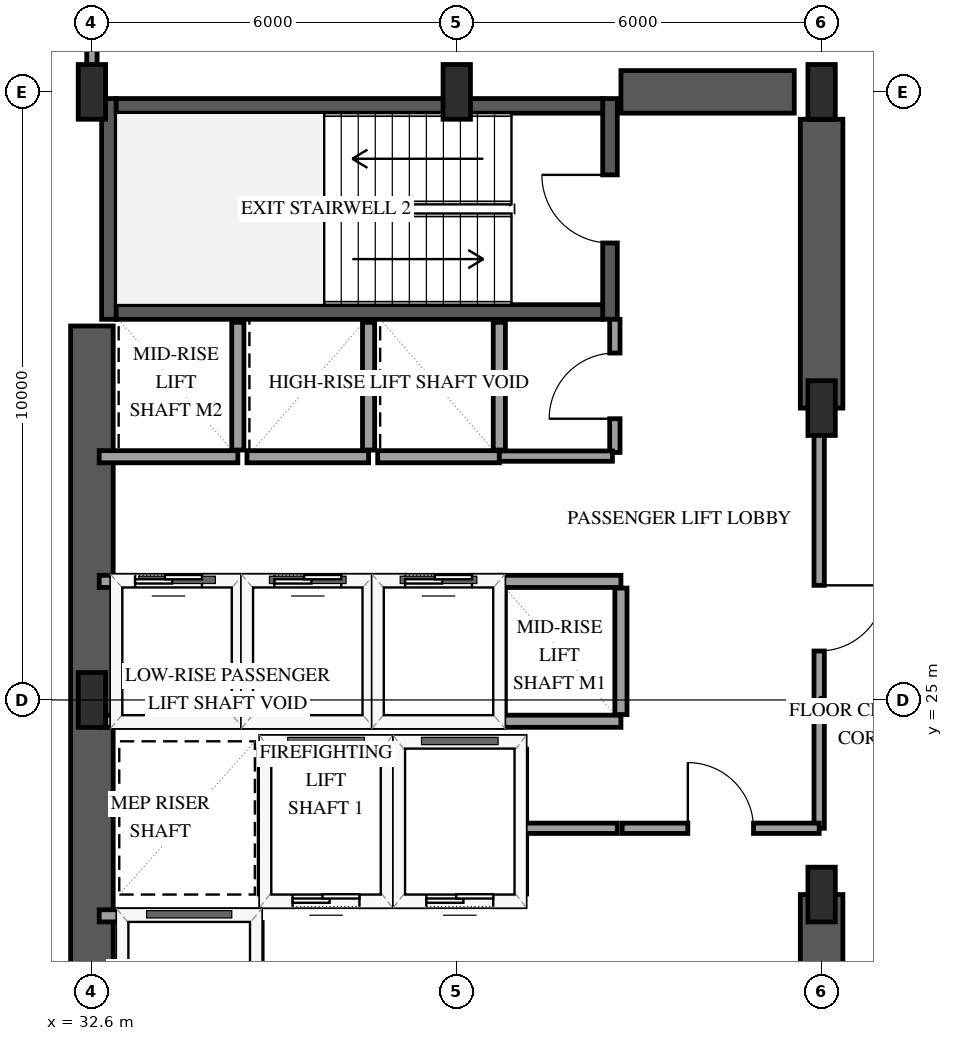
"""IFC4 building model, lengths in metres.
Left out: names, types, materials, properties, quantities, classifications, styles, units other than length and angle.
Written with IfcOpenShell. Run it as: python <this file> out.ifc"""

import sys

from ifc_helpers import new_model, si_unit, direction, frame, frame_2d, origin, origin_2d, place, context, subcontext, project, spatial, rectangle, extrude, element, fill, save


model = new_model("IFC4")
c1 = context("Model", 3, precision=1e-05, world=origin(), true_north=direction((0.0, 1.0)))
c2 = subcontext(c1, "Body", "Model", "MODEL_VIEW")
j1 = project(units=[si_unit("LENGTHUNIT", "METRE"), si_unit("PLANEANGLEUNIT", "RADIAN")], contexts=[c1])
p1 = place(None, origin())
s1 = spatial("IfcSite", under=j1, at=p1, CompositionType="ELEMENT")
p2 = place(p1, origin())
s2 = spatial("IfcBuilding", under=s1, at=p2, CompositionType="ELEMENT")
p3 = place(p2, frame((0.0, 0.0, 66.6)))
s3 = spatial("IfcBuildingStorey", under=s2, at=p3, CompositionType="ELEMENT", Elevation=66.6)
p4 = place(p3, frame((32.88, 31.26, 0.0), z_axis=(0.0, 0.0, 1.0), x_axis=(0.0, 1.0, 0.0)))
e1 = element("IfcWall", 1, at=p4, inside=s3, PredefinedType="SHEAR", context=c2, shape_type="SweptSolid", body=[
    extrude(rectangle(XDim=3.63, YDim=0.24, at=frame_2d((1.815, 0.0))), origin(), (0.0, 0.0, 1.0), 4.0),
])
p5 = place(p3, frame((41.12, 31.26, 0.0), z_axis=(0.0, 0.0, 1.0), x_axis=(0.0, 1.0, 0.0)))
e2 = element("IfcWall", 2, at=p5, inside=s3, PredefinedType="SHEAR", context=c2, shape_type="SweptSolid", body=[
    extrude(rectangle(XDim=3.63, YDim=0.24, at=frame_2d((1.815, 0.0))), origin(), (0.0, 0.0, 1.0), 4.0),
])
p6 = place(p5, frame((1.255, 0.0, 0.0)))
e3 = element("IfcOpeningElement", 3, at=p6, cuts=e2, PredefinedType="OPENING", context=c2, shape_type="SweptSolid", body=[
    extrude(rectangle(XDim=1.12, YDim=2.15, at=frame_2d((0.56, 1.075))), frame((0.0, 0.13, 0.0), z_axis=(0.0, -1.0, 0.0), x_axis=(1.0, 0.0, 0.0)), (0.0, 0.0, 1.0), 0.26),
])
for number, where, z_axis, x_axis in (
    (4, (33.0, 31.38, 0.0), (0.0, 0.0, 1.0), (1.0, 0.0, 0.0)),
    (5, (33.0, 34.77, 0.0), (0.0, 0.0, 1.0), (1.0, 0.0, 0.0)),
):
    element("IfcWall", number, at=place(p3, frame(where, z_axis=z_axis, x_axis=x_axis)), inside=s3, PredefinedType="SHEAR", context=c2, shape_type="SweptSolid", body=[
        extrude(rectangle(XDim=8.0, YDim=0.24, at=frame_2d((4.0, 0.0))), origin(), (0.0, 0.0, 1.0), 4.0),
    ])
p7 = place(p3, frame((32.6, 18.85, 0.0), z_axis=(0.0, 0.0, 1.0), x_axis=(0.0, 1.0, 0.0)))
e6 = element("IfcWall", 6, at=p7, inside=s3, PredefinedType="SHEAR", context=c2, shape_type="SweptSolid", body=[
    extrude(rectangle(XDim=12.3, YDim=0.7, at=frame_2d((6.15, 0.0))), origin(), (0.0, 0.0, 1.0), 4.0),
])
p8 = place(p3, frame((41.3, 35.0, 0.0), z_axis=(0.0, 0.0, 1.0), x_axis=(1.0, 0.0, 0.0)))
e7 = element("IfcWall", 7, at=p8, inside=s3, PredefinedType="SHEAR", context=c2, shape_type="SweptSolid", body=[
    extrude(rectangle(XDim=2.85, YDim=0.7, at=frame_2d((1.425, 0.0))), origin(), (0.0, 0.0, 1.0), 4.0),
])
p9 = place(p3, frame((44.6, 15.45, 0.0), z_axis=(0.0, 0.0, 1.0), x_axis=(0.0, 1.0, 0.0)))
e8 = element("IfcWall", 8, at=p9, inside=s3, PredefinedType="SHEAR", context=c2, shape_type="SweptSolid", body=[
    extrude(rectangle(XDim=6.35, YDim=0.7, at=frame_2d((3.175, 0.0))), origin(), (0.0, 0.0, 1.0), 4.0),
])
p10 = place(p3, frame((44.6, 29.8, 0.0), z_axis=(0.0, 0.0, 1.0), x_axis=(0.0, 1.0, 0.0)))
e9 = element("IfcWall", 9, at=p10, inside=s3, PredefinedType="SHEAR", context=c2, shape_type="SweptSolid", body=[
    extrude(rectangle(XDim=4.75, YDim=0.7, at=frame_2d((2.375, 0.0))), origin(), (0.0, 0.0, 1.0), 4.0),
])
for number, where, z_axis, x_axis in (
    (10, (32.6, 25.0, 0.0), (0.0, 0.0, 1.0), (1.0, 0.0, 0.0)),
    (11, (32.6, 35.0, 0.0), (0.0, 0.0, 1.0), (1.0, 0.0, 0.0)),
    (12, (38.6, 35.0, 0.0), (0.0, 0.0, 1.0), (1.0, 0.0, 0.0)),
    (13, (44.6, 21.8, 0.0), (0.0, 0.0, 1.0), (1.0, 0.0, 0.0)),
    (14, (44.6, 29.8, 0.0), (0.0, 0.0, 1.0), (1.0, 0.0, 0.0)),
    (15, (44.6, 35.0, 0.0), (0.0, 0.0, 1.0), (1.0, 0.0, 0.0)),
):
    element("IfcColumn", number, at=place(p3, frame(where, z_axis=z_axis, x_axis=x_axis)), inside=s3, PredefinedType="PILASTER", context=c2, shape_type="SweptSolid", body=[
        extrude(rectangle(XDim=0.45, YDim=0.9, at=origin_2d()), origin(), (0.0, 0.0, 1.0), 4.0),
    ])
p11 = place(p3, frame((35.45, 21.7, 0.0), z_axis=(0.0, 0.0, 1.0), x_axis=(1.0, 0.0, 0.0)))
e16 = element("IfcWall", 16, at=p11, inside=s3, PredefinedType="SOLIDWALL", context=c2, shape_type="SweptSolid", body=[
    extrude(rectangle(XDim=2.0, YDim=0.2, at=frame_2d((1.0, 0.0))), origin(), (0.0, 0.0, 1.0), 3.7),
])
p12 = place(p11, frame((0.45, 0.0, 0.0)))
e17 = element("IfcOpeningElement", 17, at=p12, cuts=e16, PredefinedType="OPENING", context=c2, shape_type="SweptSolid", body=[
    extrude(rectangle(XDim=1.1, YDim=2.15, at=frame_2d((0.55, 1.075))), frame((0.0, 0.11, 0.0), z_axis=(0.0, -1.0, 0.0), x_axis=(1.0, 0.0, 0.0)), (0.0, 0.0, 1.0), 0.22),
])
p13 = place(p3, frame((35.45, 24.3, 0.0), z_axis=(0.0, 0.0, 1.0), x_axis=(1.0, 0.0, 0.0)))
e18 = element("IfcWall", 18, at=p13, inside=s3, PredefinedType="SOLIDWALL", context=c2, shape_type="SweptSolid", body=[
    extrude(rectangle(XDim=2.0, YDim=0.2, at=frame_2d((1.0, 0.0))), origin(), (0.0, 0.0, 1.0), 3.7),
])
for number, where, z_axis, x_axis in (
    (19, (35.45, 21.81, 0.0), (0.0, 0.0, 1.0), (0.0, 1.0, 0.0)),
    (20, (37.45, 21.81, 0.0), (0.0, 0.0, 1.0), (0.0, 1.0, 0.0)),
):
    element("IfcWall", number, at=place(p3, frame(where, z_axis=z_axis, x_axis=x_axis)), inside=s3, PredefinedType="SOLIDWALL", context=c2, shape_type="SweptSolid", body=[
        extrude(rectangle(XDim=2.38, YDim=0.2, at=frame_2d((1.19, 0.0))), origin(), (0.0, 0.0, 1.0), 3.7),
    ])
p14 = place(p3, frame((37.65, 21.7, 0.0), z_axis=(0.0, 0.0, 1.0), x_axis=(1.0, 0.0, 0.0)))
e21 = element("IfcWall", 21, at=p14, inside=s3, PredefinedType="SOLIDWALL", context=c2, shape_type="SweptSolid", body=[
    extrude(rectangle(XDim=2.0, YDim=0.2, at=frame_2d((1.0, 0.0))), origin(), (0.0, 0.0, 1.0), 3.7),
])
p15 = place(p14, frame((0.45, 0.0, 0.0)))
e22 = element("IfcOpeningElement", 22, at=p15, cuts=e21, PredefinedType="OPENING", context=c2, shape_type="SweptSolid", body=[
    extrude(rectangle(XDim=1.1, YDim=2.15, at=frame_2d((0.55, 1.075))), frame((0.0, 0.11, 0.0), z_axis=(0.0, -1.0, 0.0), x_axis=(1.0, 0.0, 0.0)), (0.0, 0.0, 1.0), 0.22),
])
p16 = place(p3, frame((37.65, 24.3, 0.0), z_axis=(0.0, 0.0, 1.0), x_axis=(1.0, 0.0, 0.0)))
e23 = element("IfcWall", 23, at=p16, inside=s3, PredefinedType="SOLIDWALL", context=c2, shape_type="SweptSolid", body=[
    extrude(rectangle(XDim=2.0, YDim=0.2, at=frame_2d((1.0, 0.0))), origin(), (0.0, 0.0, 1.0), 3.7),
])
p17 = place(p3, frame((39.65, 21.81, 0.0), z_axis=(0.0, 0.0, 1.0), x_axis=(0.0, 1.0, 0.0)))
e24 = element("IfcWall", 24, at=p17, inside=s3, PredefinedType="SOLIDWALL", context=c2, shape_type="SweptSolid", body=[
    extrude(rectangle(XDim=2.38, YDim=0.2, at=frame_2d((1.19, 0.0))), origin(), (0.0, 0.0, 1.0), 3.7),
])
p18 = place(p3, frame((32.72, 21.45, 0.0), z_axis=(0.0, 0.0, 1.0), x_axis=(1.0, 0.0, 0.0)))
e25 = element("IfcWall", 25, at=p18, inside=s3, PredefinedType="SOLIDWALL", context=c2, shape_type="SweptSolid", body=[
    extrude(rectangle(XDim=2.58, YDim=0.2, at=frame_2d((1.29, 0.0))), origin(), (0.0, 0.0, 1.0), 3.7),
])
p19 = place(p3, frame((35.3, 18.79, 0.0), z_axis=(0.0, 0.0, 1.0), x_axis=(0.0, 1.0, 0.0)))
e26 = element("IfcWall", 26, at=p19, inside=s3, PredefinedType="SOLIDWALL", context=c2, shape_type="SweptSolid", body=[
    extrude(rectangle(XDim=2.55, YDim=0.2, at=frame_2d((1.275, 0.0))), origin(), (0.0, 0.0, 1.0), 3.7),
])
p20 = place(p19, frame((0.725, 0.0, 0.0)))
e27 = element("IfcOpeningElement", 27, at=p20, cuts=e26, PredefinedType="OPENING", context=c2, shape_type="SweptSolid", body=[
    extrude(rectangle(XDim=1.1, YDim=2.15, at=frame_2d((0.55, 1.075))), frame((0.0, 0.11, 0.0), z_axis=(0.0, -1.0, 0.0), x_axis=(1.0, 0.0, 0.0)), (0.0, 0.0, 1.0), 0.22),
])
p21 = place(p3, frame((32.72, 24.65, 0.0), z_axis=(0.0, 0.0, 1.0), x_axis=(1.0, 0.0, 0.0)))
e28 = element("IfcWall", 28, at=p21, inside=s3, PredefinedType="SOLIDWALL", context=c2, shape_type="SweptSolid", body=[
    extrude(rectangle(XDim=2.28, YDim=0.2, at=frame_2d((1.14, 0.0))), origin(), (0.0, 0.0, 1.0), 3.7),
])
p22 = place(p3, frame((32.72, 26.95, 0.0), z_axis=(0.0, 0.0, 1.0), x_axis=(1.0, 0.0, 0.0)))
e29 = element("IfcWall", 29, at=p22, inside=s3, PredefinedType="SOLIDWALL", context=c2, shape_type="SweptSolid", body=[
    extrude(rectangle(XDim=2.28, YDim=0.2, at=frame_2d((1.14, 0.0))), origin(), (0.0, 0.0, 1.0), 3.7),
])
p23 = place(p22, frame((0.59, 0.0, 0.0)))
e30 = element("IfcOpeningElement", 30, at=p23, cuts=e29, PredefinedType="OPENING", context=c2, shape_type="SweptSolid", body=[
    extrude(rectangle(XDim=1.1, YDim=2.15, at=frame_2d((0.55, 1.075))), frame((0.0, 0.11, 0.0), z_axis=(0.0, -1.0, 0.0), x_axis=(1.0, 0.0, 0.0)), (0.0, 0.0, 1.0), 0.22),
])
p24 = place(p3, frame((35.0, 24.76, 0.0), z_axis=(0.0, 0.0, 1.0), x_axis=(0.0, 1.0, 0.0)))
e31 = element("IfcWall", 31, at=p24, inside=s3, PredefinedType="SOLIDWALL", context=c2, shape_type="SweptSolid", body=[
    extrude(rectangle(XDim=2.08, YDim=0.2, at=frame_2d((1.04, 0.0))), origin(), (0.0, 0.0, 1.0), 3.7),
])
p25 = place(p3, frame((35.15, 24.65, 0.0), z_axis=(0.0, 0.0, 1.0), x_axis=(1.0, 0.0, 0.0)))
e32 = element("IfcWall", 32, at=p25, inside=s3, PredefinedType="SOLIDWALL", context=c2, shape_type="SweptSolid", body=[
    extrude(rectangle(XDim=2.0, YDim=0.2, at=frame_2d((1.0, 0.0))), origin(), (0.0, 0.0, 1.0), 3.7),
])
p26 = place(p3, frame((35.15, 26.95, 0.0), z_axis=(0.0, 0.0, 1.0), x_axis=(1.0, 0.0, 0.0)))
e33 = element("IfcWall", 33, at=p26, inside=s3, PredefinedType="SOLIDWALL", context=c2, shape_type="SweptSolid", body=[
    extrude(rectangle(XDim=2.0, YDim=0.2, at=frame_2d((1.0, 0.0))), origin(), (0.0, 0.0, 1.0), 3.7),
])
p27 = place(p26, frame((0.45, 0.0, 0.0)))
e34 = element("IfcOpeningElement", 34, at=p27, cuts=e33, PredefinedType="OPENING", context=c2, shape_type="SweptSolid", body=[
    extrude(rectangle(XDim=1.1, YDim=2.15, at=frame_2d((0.55, 1.075))), frame((0.0, 0.11, 0.0), z_axis=(0.0, -1.0, 0.0), x_axis=(1.0, 0.0, 0.0)), (0.0, 0.0, 1.0), 0.22),
])
p28 = place(p3, frame((37.15, 24.76, 0.0), z_axis=(0.0, 0.0, 1.0), x_axis=(0.0, 1.0, 0.0)))
e35 = element("IfcWall", 35, at=p28, inside=s3, PredefinedType="SOLIDWALL", context=c2, shape_type="SweptSolid", body=[
    extrude(rectangle(XDim=2.08, YDim=0.2, at=frame_2d((1.04, 0.0))), origin(), (0.0, 0.0, 1.0), 3.7),
])
p29 = place(p3, frame((37.3, 24.65, 0.0), z_axis=(0.0, 0.0, 1.0), x_axis=(1.0, 0.0, 0.0)))
e36 = element("IfcWall", 36, at=p29, inside=s3, PredefinedType="SOLIDWALL", context=c2, shape_type="SweptSolid", body=[
    extrude(rectangle(XDim=2.0, YDim=0.2, at=frame_2d((1.0, 0.0))), origin(), (0.0, 0.0, 1.0), 3.7),
])
p30 = place(p3, frame((37.3, 26.95, 0.0), z_axis=(0.0, 0.0, 1.0), x_axis=(1.0, 0.0, 0.0)))
e37 = element("IfcWall", 37, at=p30, inside=s3, PredefinedType="SOLIDWALL", context=c2, shape_type="SweptSolid", body=[
    extrude(rectangle(XDim=2.0, YDim=0.2, at=frame_2d((1.0, 0.0))), origin(), (0.0, 0.0, 1.0), 3.7),
])
p31 = place(p30, frame((0.45, 0.0, 0.0)))
e38 = element("IfcOpeningElement", 38, at=p31, cuts=e37, PredefinedType="OPENING", context=c2, shape_type="SweptSolid", body=[
    extrude(rectangle(XDim=1.1, YDim=2.15, at=frame_2d((0.55, 1.075))), frame((0.0, 0.11, 0.0), z_axis=(0.0, -1.0, 0.0), x_axis=(1.0, 0.0, 0.0)), (0.0, 0.0, 1.0), 0.22),
])
p32 = place(p3, frame((39.3, 24.76, 0.0), z_axis=(0.0, 0.0, 1.0), x_axis=(0.0, 1.0, 0.0)))
e39 = element("IfcWall", 39, at=p32, inside=s3, PredefinedType="SOLIDWALL", context=c2, shape_type="SweptSolid", body=[
    extrude(rectangle(XDim=2.08, YDim=0.2, at=frame_2d((1.04, 0.0))), origin(), (0.0, 0.0, 1.0), 3.7),
])
for number, where, z_axis, x_axis in (
    (40, (39.3, 24.65, 0.0), (0.0, 0.0, 1.0), (1.0, 0.0, 0.0)),
    (41, (39.3, 26.95, 0.0), (0.0, 0.0, 1.0), (1.0, 0.0, 0.0)),
):
    element("IfcWall", number, at=place(p3, frame(where, z_axis=z_axis, x_axis=x_axis)), inside=s3, PredefinedType="SOLIDWALL", context=c2, shape_type="SweptSolid", body=[
        extrude(rectangle(XDim=2.0, YDim=0.2, at=frame_2d((1.0, 0.0))), origin(), (0.0, 0.0, 1.0), 3.7),
    ])
p33 = place(p3, frame((41.3, 24.76, 0.0), z_axis=(0.0, 0.0, 1.0), x_axis=(0.0, 1.0, 0.0)))
e42 = element("IfcWall", 42, at=p33, inside=s3, PredefinedType="SOLIDWALL", context=c2, shape_type="SweptSolid", body=[
    extrude(rectangle(XDim=2.08, YDim=0.2, at=frame_2d((1.04, 0.0))), origin(), (0.0, 0.0, 1.0), 3.7),
])
p34 = place(p3, frame((32.72, 29.0, 0.0), z_axis=(0.0, 0.0, 1.0), x_axis=(1.0, 0.0, 0.0)))
e43 = element("IfcWall", 43, at=p34, inside=s3, PredefinedType="SOLIDWALL", context=c2, shape_type="SweptSolid", body=[
    extrude(rectangle(XDim=2.28, YDim=0.2, at=frame_2d((1.14, 0.0))), origin(), (0.0, 0.0, 1.0), 3.7),
])
p35 = place(p3, frame((35.0, 29.11, 0.0), z_axis=(0.0, 0.0, 1.0), x_axis=(0.0, 1.0, 0.0)))
e44 = element("IfcWall", 44, at=p35, inside=s3, PredefinedType="SOLIDWALL", context=c2, shape_type="SweptSolid", body=[
    extrude(rectangle(XDim=2.1, YDim=0.2, at=frame_2d((1.05, 0.0))), origin(), (0.0, 0.0, 1.0), 3.7),
])
p36 = place(p3, frame((35.15, 29.0, 0.0), z_axis=(0.0, 0.0, 1.0), x_axis=(1.0, 0.0, 0.0)))
e45 = element("IfcWall", 45, at=p36, inside=s3, PredefinedType="SOLIDWALL", context=c2, shape_type="SweptSolid", body=[
    extrude(rectangle(XDim=2.0, YDim=0.2, at=frame_2d((1.0, 0.0))), origin(), (0.0, 0.0, 1.0), 3.7),
])
p37 = place(p3, frame((37.15, 29.11, 0.0), z_axis=(0.0, 0.0, 1.0), x_axis=(0.0, 1.0, 0.0)))
e46 = element("IfcWall", 46, at=p37, inside=s3, PredefinedType="SOLIDWALL", context=c2, shape_type="SweptSolid", body=[
    extrude(rectangle(XDim=2.1, YDim=0.2, at=frame_2d((1.05, 0.0))), origin(), (0.0, 0.0, 1.0), 3.7),
])
p38 = place(p3, frame((37.3, 29.0, 0.0), z_axis=(0.0, 0.0, 1.0), x_axis=(1.0, 0.0, 0.0)))
e47 = element("IfcWall", 47, at=p38, inside=s3, PredefinedType="SOLIDWALL", context=c2, shape_type="SweptSolid", body=[
    extrude(rectangle(XDim=2.0, YDim=0.2, at=frame_2d((1.0, 0.0))), origin(), (0.0, 0.0, 1.0), 3.7),
])
p39 = place(p3, frame((39.3, 29.11, 0.0), z_axis=(0.0, 0.0, 1.0), x_axis=(0.0, 1.0, 0.0)))
e48 = element("IfcWall", 48, at=p39, inside=s3, PredefinedType="SOLIDWALL", context=c2, shape_type="SweptSolid", body=[
    extrude(rectangle(XDim=2.1, YDim=0.2, at=frame_2d((1.05, 0.0))), origin(), (0.0, 0.0, 1.0), 3.7),
])
p40 = place(p3, frame((44.56, 29.8, 0.0), z_axis=(0.0, 0.0, 1.0), x_axis=(0.0, -1.0, 0.0)))
e49 = element("IfcWall", 49, at=p40, inside=s3, PredefinedType="PARTITIONING", context=c2, shape_type="SweptSolid", body=[
    extrude(rectangle(XDim=6.91, YDim=0.17, at=frame_2d((3.455, 0.0))), origin(), (0.0, 0.0, 1.0), 2.74),
])
p41 = place(p40, frame((2.915, 0.0, 0.0)))
e50 = element("IfcOpeningElement", 50, at=p41, cuts=e49, PredefinedType="OPENING", context=c2, shape_type="SweptSolid", body=[
    extrude(rectangle(XDim=1.08, YDim=2.15, at=frame_2d((0.54, 1.075))), frame((0.0, 0.095, 0.0), z_axis=(0.0, -1.0, 0.0), x_axis=(1.0, 0.0, 0.0)), (0.0, 0.0, 1.0), 0.19),
])
p42 = place(p3, frame((41.32, 22.89, 0.0), z_axis=(0.0, 0.0, 1.0), x_axis=(1.0, 0.0, 0.0)))
e51 = element("IfcWall", 51, at=p42, inside=s3, PredefinedType="PARTITIONING", context=c2, shape_type="SweptSolid", body=[
    extrude(rectangle(XDim=3.24, YDim=0.17, at=frame_2d((1.62, 0.0))), origin(), (0.0, 0.0, 1.0), 3.7),
])
p43 = place(p42, frame((1.08, 0.0, 0.0)))
e52 = element("IfcOpeningElement", 52, at=p43, cuts=e51, PredefinedType="OPENING", context=c2, shape_type="SweptSolid", body=[
    extrude(rectangle(XDim=1.08, YDim=2.15, at=frame_2d((0.54, 1.075))), frame((0.0, 0.095, 0.0), z_axis=(0.0, -1.0, 0.0), x_axis=(1.0, 0.0, 0.0)), (0.0, 0.0, 1.0), 0.19),
])
p44 = place(p3, frame((41.2, 29.07, 0.0), z_axis=(0.0, 0.0, 1.0), x_axis=(0.0, 1.0, 0.0)))
e53 = element("IfcWall", 53, at=p44, inside=s3, PredefinedType="PARTITIONING", context=c2, shape_type="SweptSolid", body=[
    extrude(rectangle(XDim=2.19, YDim=0.17, at=frame_2d((1.095, 0.0))), origin(), (0.0, 0.0, 1.0), 3.7),
])
p45 = place(p44, frame((0.555, 0.0, 0.0)))
e54 = element("IfcOpeningElement", 54, at=p45, cuts=e53, PredefinedType="OPENING", context=c2, shape_type="SweptSolid", body=[
    extrude(rectangle(XDim=1.08, YDim=2.15, at=frame_2d((0.54, 1.075))), frame((0.0, 0.095, 0.0), z_axis=(0.0, -1.0, 0.0), x_axis=(1.0, 0.0, 0.0)), (0.0, 0.0, 1.0), 0.19),
])
p46 = place(p3, frame((32.6, 35.07, 0.0), z_axis=(0.0, 0.0, 1.0), x_axis=(0.0, 1.0, 0.0)))
e55 = element("IfcWall", 55, at=p46, inside=s3, PredefinedType="PARTITIONING", context=c2, shape_type="SweptSolid", body=[
    extrude(rectangle(XDim=1.91, YDim=0.17, at=frame_2d((0.955, 0.0))), origin(), (0.0, 0.0, 1.0), 3.7),
])
p47 = place(p3, frame((39.3, 29.01, 0.0), z_axis=(0.0, 0.0, 1.0), x_axis=(1.0, 0.0, 0.0)))
e56 = element("IfcWall", 56, at=p47, inside=s3, PredefinedType="PARTITIONING", context=c2, shape_type="SweptSolid", body=[
    extrude(rectangle(XDim=1.86, YDim=0.17, at=frame_2d((0.93, 0.0))), origin(), (0.0, 0.0, 1.0), 3.7),
])
p48 = place(p3, frame((39.72, 22.89, 0.0), z_axis=(0.0, 0.0, 1.0), x_axis=(1.0, 0.0, 0.0)))
e57 = element("IfcWall", 57, at=p48, inside=s3, PredefinedType="PARTITIONING", context=c2, shape_type="SweptSolid", body=[
    extrude(rectangle(XDim=1.52, YDim=0.17, at=frame_2d((0.76, 0.0))), origin(), (0.0, 0.0, 1.0), 3.7),
])
p49 = place(p12, origin())
e58 = element("IfcDoor", 58, at=p49, inside=s3, OperationType="SLIDING_TO_LEFT", PredefinedType="DOOR", context=c2, shape_type="SweptSolid", body=[
    extrude(rectangle(XDim=1.1, YDim=2.15, at=frame_2d((0.55, 1.075))), frame((0.0, 0.025, 0.0), z_axis=(0.0, -1.0, 0.0), x_axis=(1.0, 0.0, 0.0)), (0.0, 0.0, 1.0), 0.05),
])
fill(e17, e58)
p50 = place(p15, origin())
e59 = element("IfcDoor", 59, at=p50, inside=s3, OperationType="SLIDING_TO_LEFT", PredefinedType="DOOR", context=c2, shape_type="SweptSolid", body=[
    extrude(rectangle(XDim=1.1, YDim=2.15, at=frame_2d((0.55, 1.075))), frame((0.0, 0.025, 0.0), z_axis=(0.0, -1.0, 0.0), x_axis=(1.0, 0.0, 0.0)), (0.0, 0.0, 1.0), 0.05),
])
fill(e22, e59)
p51 = place(p23, origin())
e60 = element("IfcDoor", 60, at=p51, inside=s3, OperationType="SLIDING_TO_LEFT", PredefinedType="DOOR", context=c2, shape_type="SweptSolid", body=[
    extrude(rectangle(XDim=1.1, YDim=2.15, at=frame_2d((0.55, 1.075))), frame((0.0, 0.025, 0.0), z_axis=(0.0, -1.0, 0.0), x_axis=(1.0, 0.0, 0.0)), (0.0, 0.0, 1.0), 0.05),
])
fill(e30, e60)
p52 = place(p27, origin())
e61 = element("IfcDoor", 61, at=p52, inside=s3, OperationType="SLIDING_TO_LEFT", PredefinedType="DOOR", context=c2, shape_type="SweptSolid", body=[
    extrude(rectangle(XDim=1.1, YDim=2.15, at=frame_2d((0.55, 1.075))), frame((0.0, 0.025, 0.0), z_axis=(0.0, -1.0, 0.0), x_axis=(1.0, 0.0, 0.0)), (0.0, 0.0, 1.0), 0.05),
])
fill(e34, e61)
p53 = place(p31, origin())
e62 = element("IfcDoor", 62, at=p53, inside=s3, OperationType="SLIDING_TO_LEFT", PredefinedType="DOOR", context=c2, shape_type="SweptSolid", body=[
    extrude(rectangle(XDim=1.1, YDim=2.15, at=frame_2d((0.55, 1.075))), frame((0.0, 0.025, 0.0), z_axis=(0.0, -1.0, 0.0), x_axis=(1.0, 0.0, 0.0)), (0.0, 0.0, 1.0), 0.05),
])
fill(e38, e62)
p54 = place(p6, origin())
e63 = element("IfcDoor", 63, at=p54, inside=s3, OperationType="SINGLE_SWING_RIGHT", PredefinedType="DOOR", context=c2, shape_type="SweptSolid", body=[
    extrude(rectangle(XDim=1.12, YDim=2.15, at=frame_2d((0.56, 1.075))), frame((0.0, 0.025, 0.0), z_axis=(0.0, -1.0, 0.0), x_axis=(1.0, 0.0, 0.0)), (0.0, 0.0, 1.0), 0.05),
])
fill(e3, e63)
p55 = place(p41, origin())
e64 = element("IfcDoor", 64, at=p55, inside=s3, OperationType="SINGLE_SWING_LEFT", PredefinedType="DOOR", context=c2, shape_type="SweptSolid", body=[
    extrude(rectangle(XDim=1.08, YDim=2.15, at=frame_2d((0.54, 1.075))), frame((0.0, 0.025, 0.0), z_axis=(0.0, -1.0, 0.0), x_axis=(1.0, 0.0, 0.0)), (0.0, 0.0, 1.0), 0.05),
])
fill(e50, e64)
p56 = place(p43, origin())
e65 = element("IfcDoor", 65, at=p56, inside=s3, OperationType="SINGLE_SWING_LEFT", PredefinedType="DOOR", context=c2, shape_type="SweptSolid", body=[
    extrude(rectangle(XDim=1.08, YDim=2.15, at=frame_2d((0.54, 1.075))), frame((0.0, 0.025, 0.0), z_axis=(0.0, -1.0, 0.0), x_axis=(1.0, 0.0, 0.0)), (0.0, 0.0, 1.0), 0.05),
])
fill(e52, e65)
p57 = place(p45, origin())
e66 = element("IfcDoor", 66, at=p57, inside=s3, OperationType="SINGLE_SWING_LEFT", PredefinedType="DOOR", context=c2, shape_type="SweptSolid", body=[
    extrude(rectangle(XDim=1.08, YDim=2.15, at=frame_2d((0.54, 1.075))), frame((0.0, 0.025, 0.0), z_axis=(0.0, -1.0, 0.0), x_axis=(1.0, 0.0, 0.0)), (0.0, 0.0, 1.0), 0.05),
])
fill(e54, e66)
save(model, sys.argv[1])
